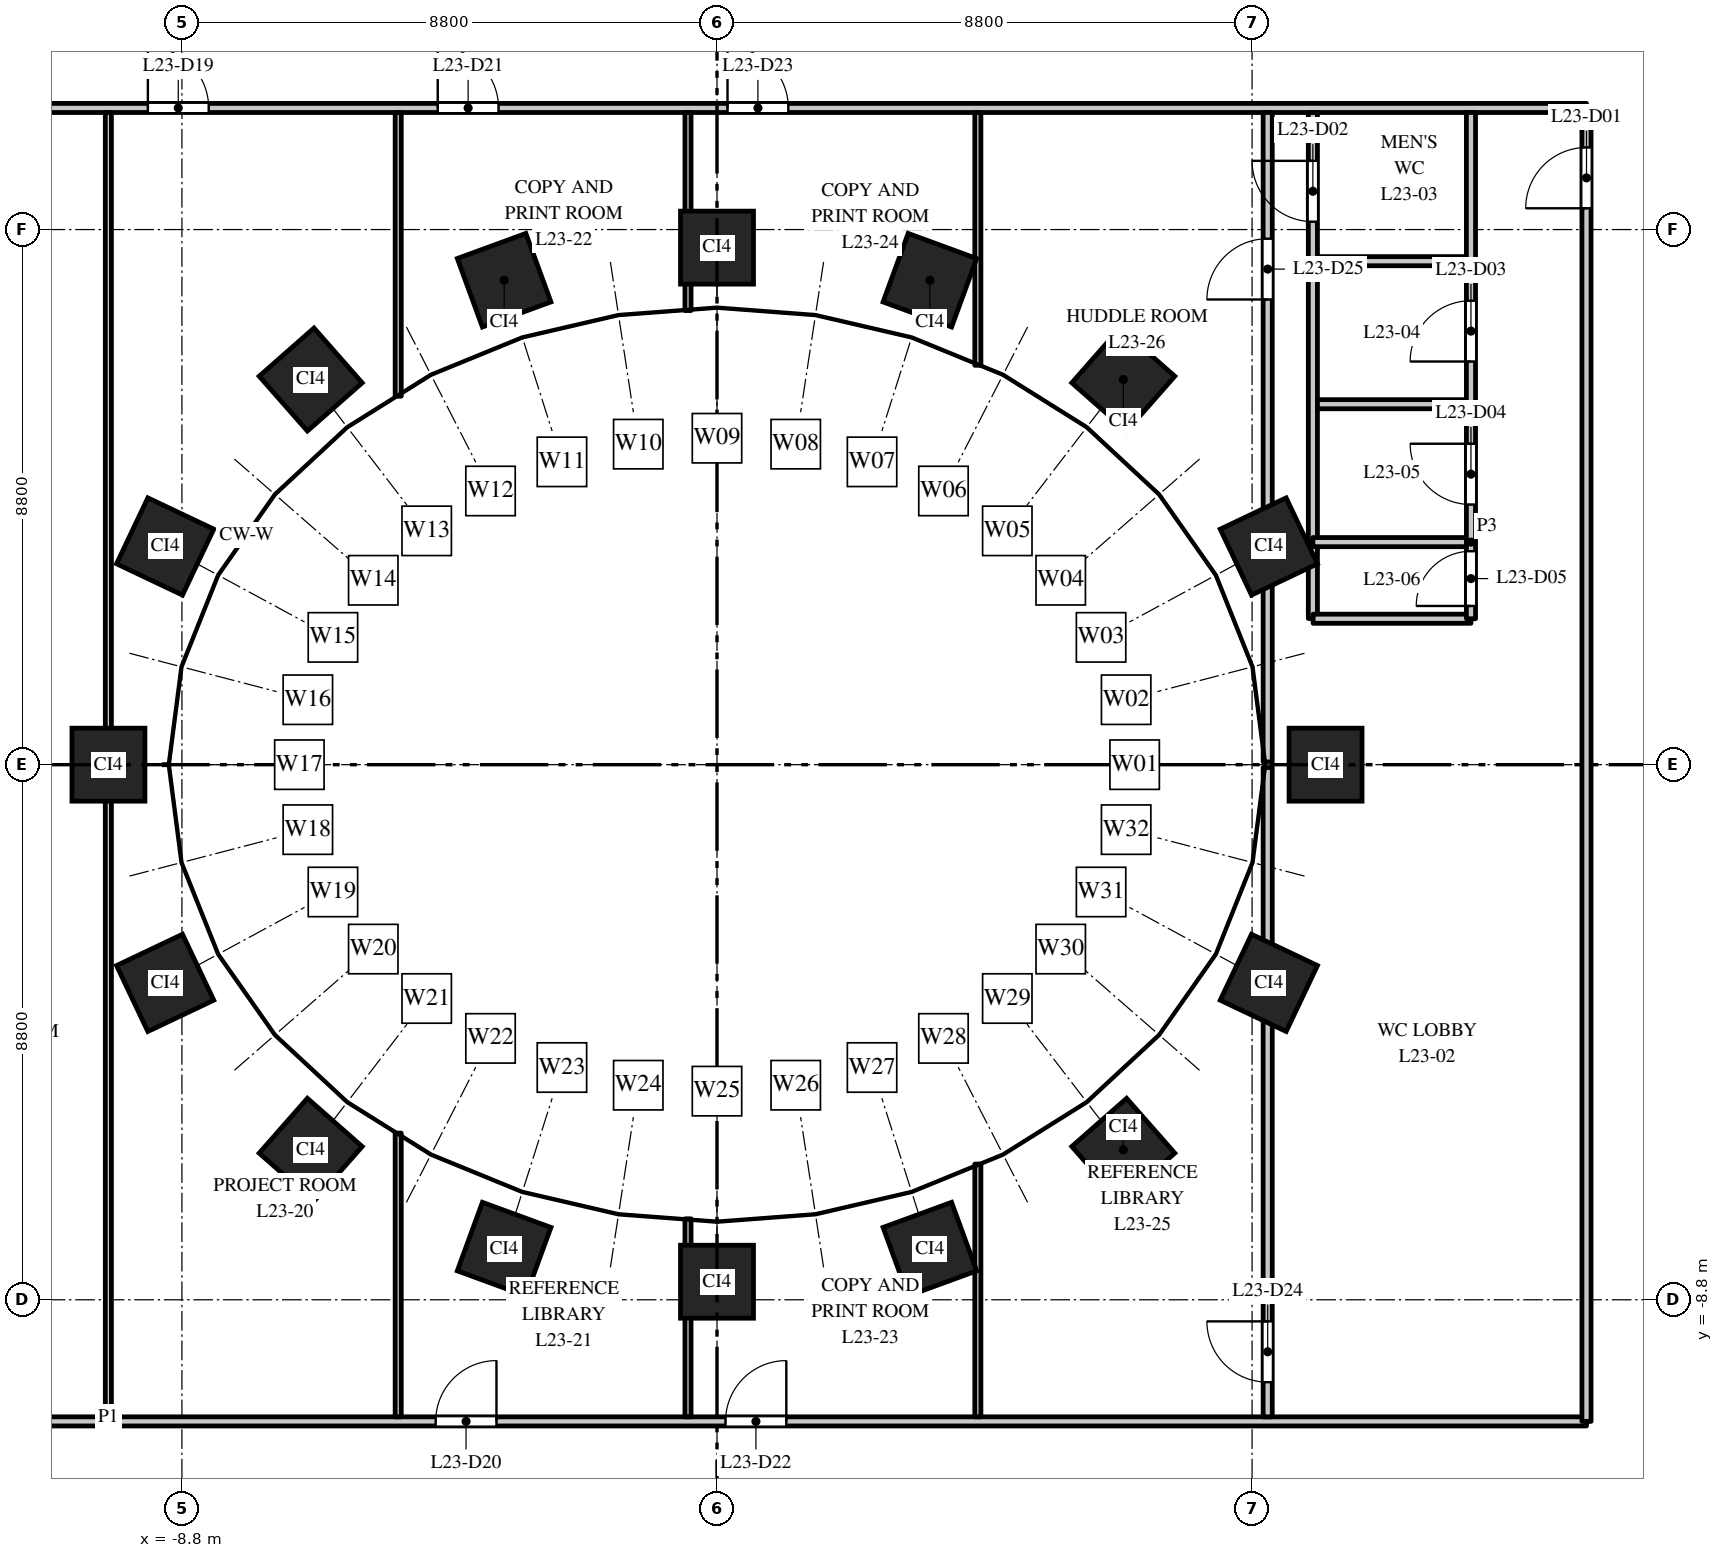
"""IFC4 building model, lengths in metres.
Left out: names, types, materials, properties, quantities, classifications, styles, units other than length and angle.
Written with IfcOpenShell. Run it as: python <this file> out.ifc"""

import sys

from ifc_helpers import new_model, si_unit, direction, frame, frame_2d, origin, origin_2d, place, context, subcontext, project, spatial, rectangle, extrude, element, fill, save


model = new_model("IFC4")
c1 = context("Model", 3, precision=1e-05, world=origin(), true_north=direction((0.0, 1.0)))
c2 = subcontext(c1, "Body", "Model", "MODEL_VIEW")
j1 = project(units=[si_unit("LENGTHUNIT", "METRE"), si_unit("PLANEANGLEUNIT", "RADIAN")], contexts=[c1])
p1 = place(None, origin())
s1 = spatial("IfcSite", under=j1, at=p1, CompositionType="ELEMENT")
p2 = place(p1, origin())
s2 = spatial("IfcBuilding", under=s1, at=p2, CompositionType="ELEMENT")
p3 = place(p2, frame((0.0, 0.0, 104.0)))
s3 = spatial("IfcBuildingStorey", under=s2, at=p3, CompositionType="ELEMENT", Elevation=104.0)
for number, where, z_axis, x_axis in (
    (1, (10.008, 0.0, 0.0), (0.0, 0.0, 1.0), (0.0, 1.0, 0.0)),
    (2, (9.076, 3.588, 0.0), (0.0, 0.0, 1.0), (-0.429, 0.903, 0.0)),
    (3, (6.682, 6.334, 0.0), (0.0, 0.0, 1.0), (-0.751, 0.66, 0.0)),
    (4, (3.501, 7.967, 0.0), (0.0, 0.0, 1.0), (-0.939, 0.344, 0.0)),
    (5, (0.0, 8.503, 0.0), (0.0, 0.0, 1.0), (-1.0, 0.0, 0.0)),
    (6, (-3.501, 7.967, 0.0), (0.0, 0.0, 1.0), (-0.939, -0.344, 0.0)),
    (7, (-6.682, 6.334, 0.0), (0.0, 0.0, 1.0), (-0.751, -0.66, 0.0)),
    (8, (-9.076, 3.588, 0.0), (0.0, 0.0, 1.0), (-0.429, -0.903, 0.0)),
    (9, (-10.008, 0.0, 0.0), (0.0, 0.0, 1.0), (0.0, -1.0, 0.0)),
    (10, (-9.076, -3.588, 0.0), (0.0, 0.0, 1.0), (0.429, -0.903, 0.0)),
    (11, (-6.682, -6.334, 0.0), (0.0, 0.0, 1.0), (0.751, -0.66, 0.0)),
    (12, (-3.501, -7.967, 0.0), (0.0, 0.0, 1.0), (0.939, -0.344, 0.0)),
    (13, (0.0, -8.503, 0.0), (0.0, 0.0, 1.0), (1.0, 0.0, 0.0)),
    (14, (3.501, -7.967, 0.0), (0.0, 0.0, 1.0), (0.939, 0.344, 0.0)),
    (15, (6.682, -6.334, 0.0), (0.0, 0.0, 1.0), (0.751, 0.66, 0.0)),
    (16, (9.076, -3.588, 0.0), (0.0, 0.0, 1.0), (0.429, 0.903, 0.0)),
):
    element("IfcColumn", number, at=place(p3, frame(where, z_axis=z_axis, x_axis=x_axis)), inside=s3, PredefinedType="COLUMN", context=c2, shape_type="SweptSolid", body=[
        extrude(rectangle(XDim=1.2, YDim=1.2, at=origin_2d()), origin(), (0.0, 0.0, 1.0), 4.0),
    ])
p4 = place(p3, frame((-14.3, -10.8, 0.0), z_axis=(0.0, 0.0, 1.0), x_axis=(1.0, 0.0, 0.0)))
e17 = element("IfcWall", 17, at=p4, inside=s3, PredefinedType="PARTITIONING", context=c2, shape_type="SweptSolid", body=[
    extrude(rectangle(XDim=28.6, YDim=0.15, at=frame_2d((14.3, 0.0))), origin(), (0.0, 0.0, 1.0), 2.85),
])
p5 = place(p4, frame((9.673, 0.0, 0.0)))
e18 = element("IfcOpeningElement", 18, at=p5, cuts=e17, PredefinedType="OPENING", context=c2, shape_type="SweptSolid", body=[
    extrude(rectangle(XDim=1.0, YDim=2.1, at=frame_2d((0.5, 1.05))), frame((0.0, 0.085, 0.0), z_axis=(0.0, -1.0, 0.0), x_axis=(1.0, 0.0, 0.0)), (0.0, 0.0, 1.0), 0.17),
])
p6 = place(p4, frame((14.44, 0.0, 0.0)))
e19 = element("IfcOpeningElement", 19, at=p6, cuts=e17, PredefinedType="OPENING", context=c2, shape_type="SweptSolid", body=[
    extrude(rectangle(XDim=1.0, YDim=2.1, at=frame_2d((0.5, 1.05))), frame((0.0, 0.085, 0.0), z_axis=(0.0, -1.0, 0.0), x_axis=(1.0, 0.0, 0.0)), (0.0, 0.0, 1.0), 0.17),
])
p7 = place(p3, frame((-14.3, 10.8, 0.0), z_axis=(0.0, 0.0, 1.0), x_axis=(1.0, 0.0, 0.0)))
e20 = element("IfcWall", 20, at=p7, inside=s3, PredefinedType="PARTITIONING", context=c2, shape_type="SweptSolid", body=[
    extrude(rectangle(XDim=28.6, YDim=0.15, at=frame_2d((14.3, 0.0))), origin(), (0.0, 0.0, 1.0), 2.85),
])
p8 = place(p7, frame((4.94, 0.0, 0.0)))
e21 = element("IfcOpeningElement", 21, at=p8, cuts=e20, PredefinedType="OPENING", context=c2, shape_type="SweptSolid", body=[
    extrude(rectangle(XDim=1.0, YDim=2.1, at=frame_2d((0.5, 1.05))), frame((0.0, 0.085, 0.0), z_axis=(0.0, -1.0, 0.0), x_axis=(1.0, 0.0, 0.0)), (0.0, 0.0, 1.0), 0.17),
])
p9 = place(p7, frame((9.707, 0.0, 0.0)))
e22 = element("IfcOpeningElement", 22, at=p9, cuts=e20, PredefinedType="OPENING", context=c2, shape_type="SweptSolid", body=[
    extrude(rectangle(XDim=1.0, YDim=2.1, at=frame_2d((0.5, 1.05))), frame((0.0, 0.085, 0.0), z_axis=(0.0, -1.0, 0.0), x_axis=(1.0, 0.0, 0.0)), (0.0, 0.0, 1.0), 0.17),
])
p10 = place(p7, frame((14.473, 0.0, 0.0)))
e23 = element("IfcOpeningElement", 23, at=p10, cuts=e20, PredefinedType="OPENING", context=c2, shape_type="SweptSolid", body=[
    extrude(rectangle(XDim=1.0, YDim=2.1, at=frame_2d((0.5, 1.05))), frame((0.0, 0.085, 0.0), z_axis=(0.0, -1.0, 0.0), x_axis=(1.0, 0.0, 0.0)), (0.0, 0.0, 1.0), 0.17),
])
p11 = place(p3, frame((-10.01, -10.725, 0.0), z_axis=(0.0, 0.0, 1.0), x_axis=(0.0, 1.0, 0.0)))
e24 = element("IfcWall", 24, at=p11, inside=s3, PredefinedType="PARTITIONING", context=c2, shape_type="SweptSolid", body=[
    extrude(rectangle(XDim=21.45, YDim=0.1, at=frame_2d((10.725, 0.0))), origin(), (0.0, 0.0, 1.0), 2.75),
])
for number, where, z_axis, x_axis in (
    (25, (-5.243, -10.725, 0.0), (0.0, 0.0, 1.0), (0.0, 1.0, 0.0)),
    (26, (-5.243, 6.059, 0.0), (0.0, 0.0, 1.0), (0.0, 1.0, 0.0)),
):
    element("IfcWall", number, at=place(p3, frame(where, z_axis=z_axis, x_axis=x_axis)), inside=s3, PredefinedType="PARTITIONING", context=c2, shape_type="SweptSolid", body=[
        extrude(rectangle(XDim=4.666, YDim=0.1, at=frame_2d((2.333, 0.0))), origin(), (0.0, 0.0, 1.0), 2.9),
    ])
for number, where, z_axis, x_axis in (
    (27, (-0.477, -10.725, 0.0), (0.0, 0.0, 1.0), (0.0, 1.0, 0.0)),
    (28, (-0.477, 7.468, 0.0), (0.0, 0.0, 1.0), (0.0, 1.0, 0.0)),
):
    element("IfcWall", number, at=place(p3, frame(where, z_axis=z_axis, x_axis=x_axis)), inside=s3, PredefinedType="PARTITIONING", context=c2, shape_type="SweptSolid", body=[
        extrude(rectangle(XDim=3.257, YDim=0.1, at=frame_2d((1.628, 0.0))), origin(), (0.0, 0.0, 1.0), 2.9),
    ])
for number, where, z_axis, x_axis in (
    (29, (4.29, -10.725, 0.0), (0.0, 0.0, 1.0), (0.0, 1.0, 0.0)),
    (30, (4.29, 6.568, 0.0), (0.0, 0.0, 1.0), (0.0, 1.0, 0.0)),
):
    element("IfcWall", number, at=place(p3, frame(where, z_axis=z_axis, x_axis=x_axis)), inside=s3, PredefinedType="PARTITIONING", context=c2, shape_type="SweptSolid", body=[
        extrude(rectangle(XDim=4.157, YDim=0.1, at=frame_2d((2.079, 0.0))), origin(), (0.0, 0.0, 1.0), 2.9),
    ])
p12 = place(p3, frame((9.057, -10.725, 0.0), z_axis=(0.0, 0.0, 1.0), x_axis=(0.0, 1.0, 0.0)))
e31 = element("IfcWall", 31, at=p12, inside=s3, PredefinedType="PARTITIONING", context=c2, shape_type="SweptSolid", body=[
    extrude(rectangle(XDim=10.68, YDim=0.15, at=frame_2d((5.34, 0.0))), origin(), (0.0, 0.0, 1.0), 2.75),
])
p13 = place(p12, frame((0.57, 0.0, 0.0)))
e32 = element("IfcOpeningElement", 32, at=p13, cuts=e31, PredefinedType="OPENING", context=c2, shape_type="SweptSolid", body=[
    extrude(rectangle(XDim=1.0, YDim=2.1, at=frame_2d((0.5, 1.05))), frame((0.0, 0.085, 0.0), z_axis=(0.0, -1.0, 0.0), x_axis=(1.0, 0.0, 0.0)), (0.0, 0.0, 1.0), 0.17),
])
p14 = place(p3, frame((9.057, 0.045, 0.0), z_axis=(0.0, 0.0, 1.0), x_axis=(0.0, 1.0, 0.0)))
e33 = element("IfcWall", 33, at=p14, inside=s3, PredefinedType="PARTITIONING", context=c2, shape_type="SweptSolid", body=[
    extrude(rectangle(XDim=10.68, YDim=0.15, at=frame_2d((5.34, 0.0))), origin(), (0.0, 0.0, 1.0), 2.75),
])
p15 = place(p14, frame((7.605, 0.0, 0.0)))
e34 = element("IfcOpeningElement", 34, at=p15, cuts=e33, PredefinedType="OPENING", context=c2, shape_type="SweptSolid", body=[
    extrude(rectangle(XDim=1.0, YDim=2.1, at=frame_2d((0.5, 1.05))), frame((0.0, 0.085, 0.0), z_axis=(0.0, -1.0, 0.0), x_axis=(1.0, 0.0, 0.0)), (0.0, 0.0, 1.0), 0.17),
])
p16 = place(p3, frame((9.8, 2.404, 0.0), z_axis=(0.0, 0.0, 1.0), x_axis=(0.0, 1.0, 0.0)))
e35 = element("IfcWall", 35, at=p16, inside=s3, PredefinedType="PARTITIONING", context=c2, shape_type="SweptSolid", body=[
    extrude(rectangle(XDim=1.256, YDim=0.15, at=frame_2d((0.628, 0.0))), origin(), (0.0, 0.0, 1.0), 3.7),
])
p17 = place(p3, frame((9.8, 3.66, 0.0), z_axis=(0.0, 0.0, 1.0), x_axis=(0.0, 1.0, 0.0)))
e36 = element("IfcWall", 36, at=p17, inside=s3, PredefinedType="PARTITIONING", context=c2, shape_type="SweptSolid", body=[
    extrude(rectangle(XDim=7.065, YDim=0.15, at=frame_2d((3.533, 0.0))), origin(), (0.0, 0.0, 1.0), 2.75),
])
p18 = place(p17, frame((5.27, 0.0, 0.0)))
e37 = element("IfcOpeningElement", 37, at=p18, cuts=e36, PredefinedType="OPENING", context=c2, shape_type="SweptSolid", body=[
    extrude(rectangle(XDim=1.0, YDim=2.1, at=frame_2d((0.5, 1.05))), frame((0.0, 0.085, 0.0), z_axis=(0.0, -1.0, 0.0), x_axis=(1.0, 0.0, 0.0)), (0.0, 0.0, 1.0), 0.17),
])
p19 = place(p3, frame((9.8, 3.66, 0.0), z_axis=(0.0, 0.0, 1.0), x_axis=(1.0, 0.0, 0.0)))
e38 = element("IfcWall", 38, at=p19, inside=s3, PredefinedType="PARTITIONING", context=c2, shape_type="SweptSolid", body=[
    extrude(rectangle(XDim=2.6, YDim=0.15, at=frame_2d((1.3, 0.0))), origin(), (0.0, 0.0, 1.0), 3.7),
])
p20 = place(p3, frame((9.875, 5.928, 0.0), z_axis=(0.0, 0.0, 1.0), x_axis=(1.0, 0.0, 0.0)))
e39 = element("IfcWall", 39, at=p20, inside=s3, PredefinedType="PARTITIONING", context=c2, shape_type="SweptSolid", body=[
    extrude(rectangle(XDim=2.45, YDim=0.15, at=frame_2d((1.225, 0.0))), origin(), (0.0, 0.0, 1.0), 2.75),
])
p21 = place(p3, frame((9.875, 8.28, 0.0), z_axis=(0.0, 0.0, 1.0), x_axis=(1.0, 0.0, 0.0)))
e40 = element("IfcWall", 40, at=p21, inside=s3, PredefinedType="PARTITIONING", context=c2, shape_type="SweptSolid", body=[
    extrude(rectangle(XDim=2.45, YDim=0.15, at=frame_2d((1.225, 0.0))), origin(), (0.0, 0.0, 1.0), 3.7),
])
p22 = place(p3, frame((9.804, 2.4, 0.0), z_axis=(0.0, 0.0, 1.0), x_axis=(1.0, 0.0, 0.0)))
e41 = element("IfcWall", 41, at=p22, inside=s3, PredefinedType="PARTITIONING", context=c2, shape_type="SweptSolid", body=[
    extrude(rectangle(XDim=2.596, YDim=0.15, at=frame_2d((1.298, 0.0))), origin(), (0.0, 0.0, 1.0), 3.7),
])
p23 = place(p3, frame((12.4, 2.4, 0.0), z_axis=(0.0, 0.0, 1.0), x_axis=(0.0, 1.0, 0.0)))
e42 = element("IfcWall", 42, at=p23, inside=s3, PredefinedType="PARTITIONING", context=c2, shape_type="SweptSolid", body=[
    extrude(rectangle(XDim=1.26, YDim=0.15, at=frame_2d((0.63, 0.0))), origin(), (0.0, 0.0, 1.0), 3.7),
])
p24 = place(p23, frame((0.21, 0.0, 0.0)))
e43 = element("IfcOpeningElement", 43, at=p24, cuts=e42, PredefinedType="OPENING", context=c2, shape_type="SweptSolid", body=[
    extrude(rectangle(XDim=0.9, YDim=2.1, at=frame_2d((0.45, 1.05))), frame((0.0, 0.085, 0.0), z_axis=(0.0, -1.0, 0.0), x_axis=(1.0, 0.0, 0.0)), (0.0, 0.0, 1.0), 0.17),
])
p25 = place(p3, frame((12.4, 3.66, 0.0), z_axis=(0.0, 0.0, 1.0), x_axis=(0.0, 1.0, 0.0)))
e44 = element("IfcWall", 44, at=p25, inside=s3, PredefinedType="PARTITIONING", context=c2, shape_type="SweptSolid", body=[
    extrude(rectangle(XDim=7.065, YDim=0.15, at=frame_2d((3.533, 0.0))), origin(), (0.0, 0.0, 1.0), 2.75),
])
p26 = place(p25, frame((2.97, 0.0, 0.0)))
e45 = element("IfcOpeningElement", 45, at=p26, cuts=e44, PredefinedType="OPENING", context=c2, shape_type="SweptSolid", body=[
    extrude(rectangle(XDim=1.0, YDim=2.1, at=frame_2d((0.5, 1.05))), frame((0.0, 0.085, 0.0), z_axis=(0.0, -1.0, 0.0), x_axis=(1.0, 0.0, 0.0)), (0.0, 0.0, 1.0), 0.17),
])
p27 = place(p25, frame((0.618, 0.0, 0.0)))
e46 = element("IfcOpeningElement", 46, at=p27, cuts=e44, PredefinedType="OPENING", context=c2, shape_type="SweptSolid", body=[
    extrude(rectangle(XDim=1.0, YDim=2.1, at=frame_2d((0.5, 1.05))), frame((0.0, 0.085, 0.0), z_axis=(0.0, -1.0, 0.0), x_axis=(1.0, 0.0, 0.0)), (0.0, 0.0, 1.0), 0.17),
])
p28 = place(p3, frame((14.3, -10.8, 0.0), z_axis=(0.0, 0.0, 1.0), x_axis=(0.0, 1.0, 0.0)))
e47 = element("IfcWall", 47, at=p28, inside=s3, PredefinedType="PARTITIONING", context=c2, shape_type="SweptSolid", body=[
    extrude(rectangle(XDim=21.6, YDim=0.15, at=frame_2d((10.8, 0.0))), origin(), (0.0, 0.0, 1.0), 2.75),
])
p29 = place(p28, frame((19.95, 0.0, 0.0)))
e48 = element("IfcOpeningElement", 48, at=p29, cuts=e47, PredefinedType="OPENING", context=c2, shape_type="SweptSolid", body=[
    extrude(rectangle(XDim=1.0, YDim=2.1, at=frame_2d((0.5, 1.05))), frame((0.0, 0.085, 0.0), z_axis=(0.0, -1.0, 0.0), x_axis=(1.0, 0.0, 0.0)), (0.0, 0.0, 1.0), 0.17),
])
p30 = place(p29, origin())
e49 = element("IfcDoor", 49, at=p30, inside=s3, OperationType="SINGLE_SWING_LEFT", PredefinedType="DOOR", context=c2, shape_type="SweptSolid", body=[
    extrude(rectangle(XDim=1.0, YDim=2.1, at=frame_2d((0.5, 1.05))), frame((0.0, 0.025, 0.0), z_axis=(0.0, -1.0, 0.0), x_axis=(1.0, 0.0, 0.0)), (0.0, 0.0, 1.0), 0.05),
])
fill(e48, e49)
p31 = place(p18, origin())
e50 = element("IfcDoor", 50, at=p31, inside=s3, OperationType="SINGLE_SWING_RIGHT", PredefinedType="DOOR", context=c2, shape_type="SweptSolid", body=[
    extrude(rectangle(XDim=1.0, YDim=2.1, at=frame_2d((0.5, 1.05))), frame((0.0, 0.025, 0.0), z_axis=(0.0, -1.0, 0.0), x_axis=(1.0, 0.0, 0.0)), (0.0, 0.0, 1.0), 0.05),
])
fill(e37, e50)
p32 = place(p26, origin())
e51 = element("IfcDoor", 51, at=p32, inside=s3, OperationType="SINGLE_SWING_LEFT", PredefinedType="DOOR", context=c2, shape_type="SweptSolid", body=[
    extrude(rectangle(XDim=1.0, YDim=2.1, at=frame_2d((0.5, 1.05))), frame((0.0, 0.025, 0.0), z_axis=(0.0, -1.0, 0.0), x_axis=(1.0, 0.0, 0.0)), (0.0, 0.0, 1.0), 0.05),
])
fill(e45, e51)
p33 = place(p27, origin())
e52 = element("IfcDoor", 52, at=p33, inside=s3, OperationType="SINGLE_SWING_RIGHT", PredefinedType="DOOR", context=c2, shape_type="SweptSolid", body=[
    extrude(rectangle(XDim=1.0, YDim=2.1, at=frame_2d((0.5, 1.05))), frame((0.0, 0.025, 0.0), z_axis=(0.0, -1.0, 0.0), x_axis=(1.0, 0.0, 0.0)), (0.0, 0.0, 1.0), 0.05),
])
fill(e46, e52)
p34 = place(p24, origin())
e53 = element("IfcDoor", 53, at=p34, inside=s3, OperationType="SINGLE_SWING_LEFT", PredefinedType="DOOR", context=c2, shape_type="SweptSolid", body=[
    extrude(rectangle(XDim=0.9, YDim=2.1, at=frame_2d((0.45, 1.05))), frame((0.0, 0.025, 0.0), z_axis=(0.0, -1.0, 0.0), x_axis=(1.0, 0.0, 0.0)), (0.0, 0.0, 1.0), 0.05),
])
fill(e43, e53)
p35 = place(p8, origin())
e54 = element("IfcDoor", 54, at=p35, inside=s3, OperationType="SINGLE_SWING_LEFT", PredefinedType="DOOR", context=c2, shape_type="SweptSolid", body=[
    extrude(rectangle(XDim=1.0, YDim=2.1, at=frame_2d((0.5, 1.05))), frame((0.0, 0.025, 0.0), z_axis=(0.0, -1.0, 0.0), x_axis=(1.0, 0.0, 0.0)), (0.0, 0.0, 1.0), 0.05),
])
fill(e21, e54)
p36 = place(p5, origin())
e55 = element("IfcDoor", 55, at=p36, inside=s3, OperationType="SINGLE_SWING_RIGHT", PredefinedType="DOOR", context=c2, shape_type="SweptSolid", body=[
    extrude(rectangle(XDim=1.0, YDim=2.1, at=frame_2d((0.5, 1.05))), frame((0.0, 0.025, 0.0), z_axis=(0.0, -1.0, 0.0), x_axis=(1.0, 0.0, 0.0)), (0.0, 0.0, 1.0), 0.05),
])
fill(e18, e55)
p37 = place(p9, origin())
e56 = element("IfcDoor", 56, at=p37, inside=s3, OperationType="SINGLE_SWING_LEFT", PredefinedType="DOOR", context=c2, shape_type="SweptSolid", body=[
    extrude(rectangle(XDim=1.0, YDim=2.1, at=frame_2d((0.5, 1.05))), frame((0.0, 0.025, 0.0), z_axis=(0.0, -1.0, 0.0), x_axis=(1.0, 0.0, 0.0)), (0.0, 0.0, 1.0), 0.05),
])
fill(e22, e56)
p38 = place(p6, origin())
e57 = element("IfcDoor", 57, at=p38, inside=s3, OperationType="SINGLE_SWING_RIGHT", PredefinedType="DOOR", context=c2, shape_type="SweptSolid", body=[
    extrude(rectangle(XDim=1.0, YDim=2.1, at=frame_2d((0.5, 1.05))), frame((0.0, 0.025, 0.0), z_axis=(0.0, -1.0, 0.0), x_axis=(1.0, 0.0, 0.0)), (0.0, 0.0, 1.0), 0.05),
])
fill(e19, e57)
p39 = place(p10, origin())
e58 = element("IfcDoor", 58, at=p39, inside=s3, OperationType="SINGLE_SWING_LEFT", PredefinedType="DOOR", context=c2, shape_type="SweptSolid", body=[
    extrude(rectangle(XDim=1.0, YDim=2.1, at=frame_2d((0.5, 1.05))), frame((0.0, 0.025, 0.0), z_axis=(0.0, -1.0, 0.0), x_axis=(1.0, 0.0, 0.0)), (0.0, 0.0, 1.0), 0.05),
])
fill(e23, e58)
p40 = place(p13, origin())
e59 = element("IfcDoor", 59, at=p40, inside=s3, OperationType="SINGLE_SWING_RIGHT", PredefinedType="DOOR", context=c2, shape_type="SweptSolid", body=[
    extrude(rectangle(XDim=1.0, YDim=2.1, at=frame_2d((0.5, 1.05))), frame((0.0, 0.025, 0.0), z_axis=(0.0, -1.0, 0.0), x_axis=(1.0, 0.0, 0.0)), (0.0, 0.0, 1.0), 0.05),
])
fill(e32, e59)
p41 = place(p15, origin())
e60 = element("IfcDoor", 60, at=p41, inside=s3, OperationType="SINGLE_SWING_LEFT", PredefinedType="DOOR", context=c2, shape_type="SweptSolid", body=[
    extrude(rectangle(XDim=1.0, YDim=2.1, at=frame_2d((0.5, 1.05))), frame((0.0, 0.025, 0.0), z_axis=(0.0, -1.0, 0.0), x_axis=(1.0, 0.0, 0.0)), (0.0, 0.0, 1.0), 0.05),
])
fill(e34, e60)
save(model, sys.argv[1])
